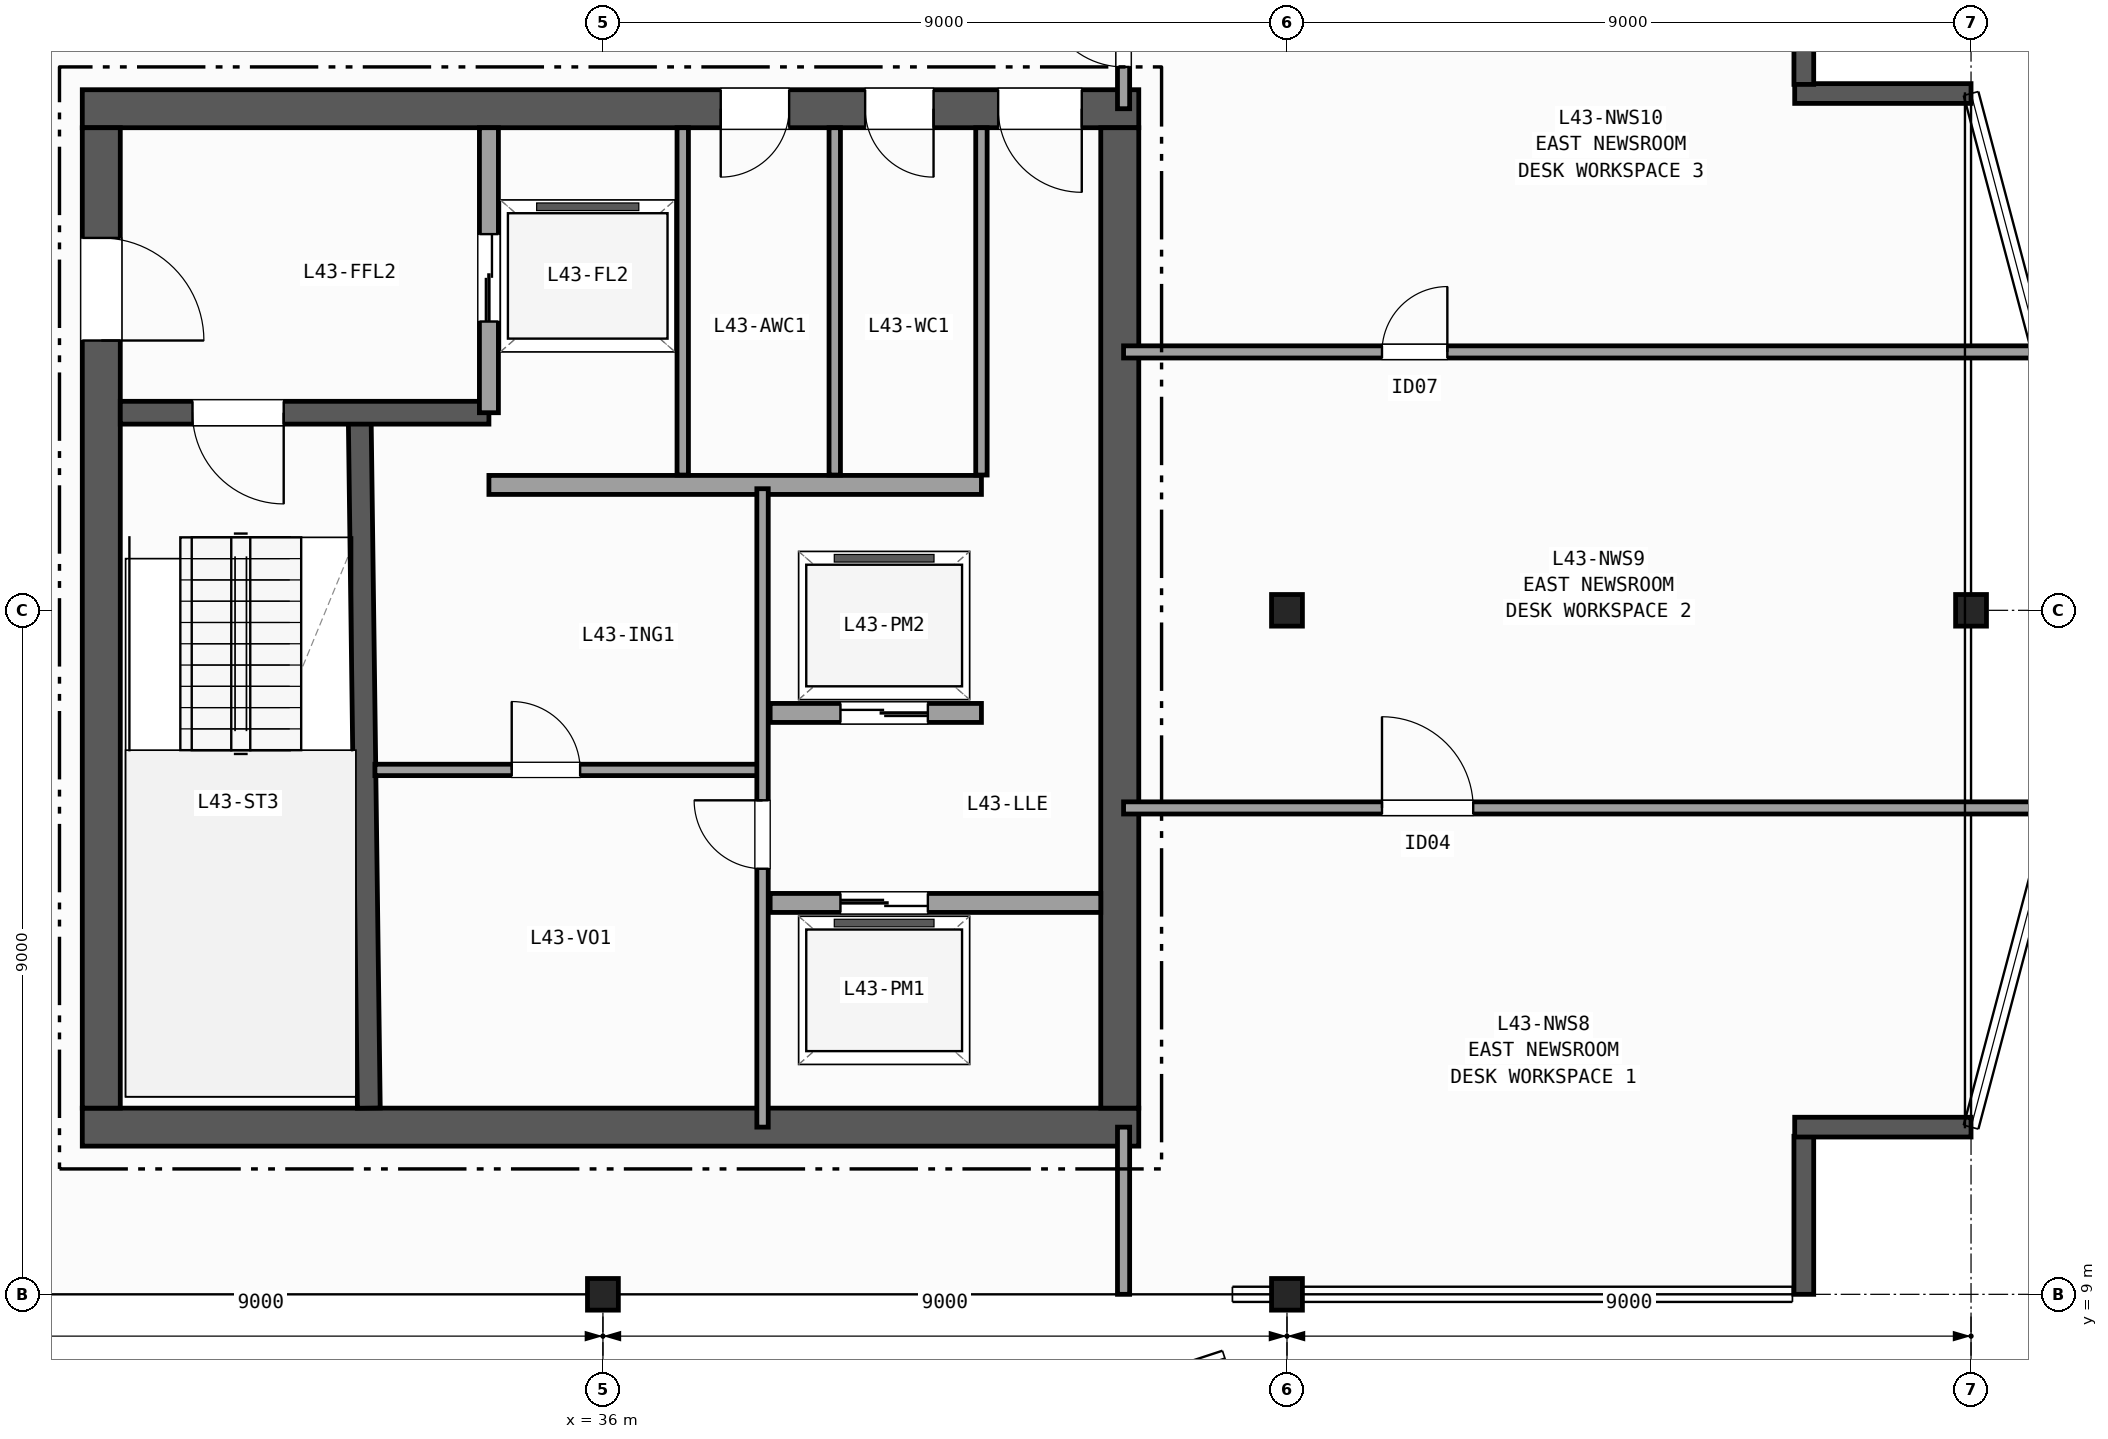
"""IFC4 building model, lengths in metres.
Left out: names, types, materials, properties, quantities, classifications, styles, units other than length and angle.
Written with IfcOpenShell. Run it as: python <this file> out.ifc"""

import sys

from ifc_helpers import new_model, si_unit, direction, frame, frame_2d, origin, origin_2d, place, context, subcontext, project, spatial, rectangle, i_section, extrude, element, fill, save


model = new_model("IFC4")
c1 = context("Model", 3, precision=1e-05, world=origin(), true_north=direction((0.0, 1.0)))
c2 = subcontext(c1, "Body", "Model", "MODEL_VIEW")
j1 = project(units=[si_unit("LENGTHUNIT", "METRE"), si_unit("PLANEANGLEUNIT", "RADIAN")], contexts=[c1])
p1 = place(None, origin())
s1 = spatial("IfcSite", under=j1, at=p1, CompositionType="ELEMENT")
p2 = place(p1, origin())
s2 = spatial("IfcBuilding", under=s1, at=p2, CompositionType="ELEMENT")
p3 = place(p2, frame((0.0, 0.0, 174.2)))
s3 = spatial("IfcBuildingStorey", under=s2, at=p3, CompositionType="ELEMENT", Elevation=174.2)
for number, where, z_axis, x_axis in (
    (1, (36.0, 9.0, 0.0), (0.0, 0.0, 1.0), (1.0, 0.0, 0.0)),
    (2, (45.0, 9.0, 0.0), (0.0, 0.0, 1.0), (1.0, 0.0, 0.0)),
    (3, (45.0, 18.0, 0.0), (0.0, 0.0, 1.0), (1.0, 0.0, 0.0)),
    (4, (54.0, 18.0, 0.0), (0.0, 0.0, 1.0), (1.0, 0.0, 0.0)),
):
    element("IfcColumn", number, at=place(p3, frame(where, z_axis=z_axis, x_axis=x_axis)), inside=s3, PredefinedType="COLUMN", context=c2, shape_type="SweptSolid", body=[
        extrude(i_section(OverallWidth=0.406, OverallDepth=0.416, WebThickness=0.03, FlangeThickness=0.048, FilletRadius=0.015, at=origin_2d()), origin(), (0.0, 0.0, 1.0), 3.7),
    ])
p4 = place(p3, frame((51.8, 9.0, 0.0), z_axis=(0.0, 0.0, 1.0), x_axis=(0.0, 1.0, 0.0)))
e5 = element("IfcWall", 5, at=p4, inside=s3, PredefinedType="SOLIDWALL", context=c2, shape_type="SweptSolid", body=[
    extrude(rectangle(XDim=2.08, YDim=0.26, at=frame_2d((1.04, 0.0))), origin(), (0.0, 0.0, 1.0), 3.42),
])
for number, where, z_axis, x_axis in (
    (6, (51.68, 11.2, 0.0), (0.0, 0.0, 1.0), (1.0, 0.0, 0.0)),
    (7, (54.0, 24.8, 0.0), (0.0, 0.0, 1.0), (-1.0, 0.0, 0.0)),
):
    element("IfcWall", number, at=place(p3, frame(where, z_axis=z_axis, x_axis=x_axis)), inside=s3, PredefinedType="SOLIDWALL", context=c2, shape_type="SweptSolid", body=[
        extrude(rectangle(XDim=2.32, YDim=0.26, at=frame_2d((1.16, 0.0))), origin(), (0.0, 0.0, 1.0), 3.42),
    ])
p5 = place(p3, frame((51.8, 24.92, 0.0), z_axis=(0.0, 0.0, 1.0), x_axis=(0.0, 1.0, 0.0)))
e8 = element("IfcWall", 8, at=p5, inside=s3, PredefinedType="SOLIDWALL", context=c2, shape_type="SweptSolid", body=[
    extrude(rectangle(XDim=2.08, YDim=0.26, at=frame_2d((1.04, 0.0))), origin(), (0.0, 0.0, 1.0), 3.42),
])
p6 = place(p3, frame((29.15, 11.2, 0.0), z_axis=(0.0, 0.0, 1.0), x_axis=(1.0, 0.0, 0.0)))
e9 = element("IfcWall", 9, at=p6, inside=s3, PredefinedType="SHEAR", context=c2, shape_type="SweptSolid", body=[
    extrude(rectangle(XDim=13.9, YDim=0.5, at=frame_2d((6.95, 0.0))), origin(), (0.0, 0.0, 1.0), 3.42),
])
p7 = place(p3, frame((43.05, 24.6, 0.0), z_axis=(0.0, 0.0, 1.0), x_axis=(-1.0, 0.0, 0.0)))
e10 = element("IfcWall", 10, at=p7, inside=s3, PredefinedType="SHEAR", context=c2, shape_type="SweptSolid", body=[
    extrude(rectangle(XDim=13.9, YDim=0.5, at=frame_2d((6.95, 0.0))), origin(), (0.0, 0.0, 1.0), 3.42),
])
p8 = place(p7, frame((0.75, 0.0, 0.0)))
e11 = element("IfcOpeningElement", 11, at=p8, cuts=e10, PredefinedType="OPENING", context=c2, shape_type="SweptSolid", body=[
    extrude(rectangle(XDim=1.1, YDim=2.15, at=frame_2d((0.55, 1.075))), frame((0.0, 0.26, 0.0), z_axis=(0.0, -1.0, 0.0), x_axis=(1.0, 0.0, 0.0)), (0.0, 0.0, 1.0), 0.52),
])
p9 = place(p7, frame((2.7, 0.0, 0.0)))
e12 = element("IfcOpeningElement", 12, at=p9, cuts=e10, PredefinedType="OPENING", context=c2, shape_type="SweptSolid", body=[
    extrude(rectangle(XDim=0.9, YDim=2.1, at=frame_2d((0.45, 1.05))), frame((0.0, 0.26, 0.0), z_axis=(0.0, -1.0, 0.0), x_axis=(1.0, 0.0, 0.0)), (0.0, 0.0, 1.0), 0.52),
])
p10 = place(p7, frame((4.6, 0.0, 0.0)))
e13 = element("IfcOpeningElement", 13, at=p10, cuts=e10, PredefinedType="OPENING", context=c2, shape_type="SweptSolid", body=[
    extrude(rectangle(XDim=0.9, YDim=2.1, at=frame_2d((0.45, 1.05))), frame((0.0, 0.26, 0.0), z_axis=(0.0, -1.0, 0.0), x_axis=(1.0, 0.0, 0.0)), (0.0, 0.0, 1.0), 0.52),
])
p11 = place(p3, frame((29.4, 24.35, 0.0), z_axis=(0.0, 0.0, 1.0), x_axis=(0.0, -1.0, 0.0)))
e14 = element("IfcWall", 14, at=p11, inside=s3, PredefinedType="SHEAR", context=c2, shape_type="SweptSolid", body=[
    extrude(rectangle(XDim=12.9, YDim=0.5, at=frame_2d((6.45, 0.0))), origin(), (0.0, 0.0, 1.0), 3.42),
])
p12 = place(p11, frame((1.45, 0.0, 0.0)))
e15 = element("IfcOpeningElement", 15, at=p12, cuts=e14, PredefinedType="OPENING", context=c2, shape_type="SweptSolid", body=[
    extrude(rectangle(XDim=1.35, YDim=2.15, at=frame_2d((0.675, 1.075))), frame((0.0, 0.26, 0.0), z_axis=(0.0, -1.0, 0.0), x_axis=(1.0, 0.0, 0.0)), (0.0, 0.0, 1.0), 0.52),
])
p13 = place(p3, frame((42.8, 11.45, 0.0), z_axis=(0.0, 0.0, 1.0), x_axis=(0.0, 1.0, 0.0)))
e16 = element("IfcWall", 16, at=p13, inside=s3, PredefinedType="SHEAR", context=c2, shape_type="SweptSolid", body=[
    extrude(rectangle(XDim=12.9, YDim=0.5, at=frame_2d((6.45, 0.0))), origin(), (0.0, 0.0, 1.0), 3.42),
])
p14 = place(p3, frame((32.92, 11.45, 0.0), z_axis=(0.0, 0.0, 1.0), x_axis=(-0.013171578211, 0.999913251001, 0.0)))
e17 = element("IfcWall", 17, at=p14, inside=s3, PredefinedType="SHEAR", context=c2, shape_type="SweptSolid", body=[
    extrude(rectangle(XDim=9.101, YDim=0.3, at=frame_2d((4.55, 0.0))), origin(), (0.0, 0.0, 1.0), 3.42),
])
p15 = place(p3, frame((34.5, 20.6, 0.0), z_axis=(0.0, 0.0, 1.0), x_axis=(-1.0, 0.0, 0.0)))
e18 = element("IfcWall", 18, at=p15, inside=s3, PredefinedType="SHEAR", context=c2, shape_type="SweptSolid", body=[
    extrude(rectangle(XDim=4.85, YDim=0.3, at=frame_2d((2.425, 0.0))), origin(), (0.0, 0.0, 1.0), 3.42),
])
p16 = place(p15, frame((2.7, 0.0, 0.0)))
e19 = element("IfcOpeningElement", 19, at=p16, cuts=e18, PredefinedType="OPENING", context=c2, shape_type="SweptSolid", body=[
    extrude(rectangle(XDim=1.2, YDim=2.15, at=frame_2d((0.6, 1.075))), frame((0.0, 0.16, 0.0), z_axis=(0.0, -1.0, 0.0), x_axis=(1.0, 0.0, 0.0)), (0.0, 0.0, 1.0), 0.32),
])
p17 = place(p3, frame((34.5, 20.6, 0.0), z_axis=(0.0, 0.0, 1.0), x_axis=(0.0, 1.0, 0.0)))
e20 = element("IfcWall", 20, at=p17, inside=s3, PredefinedType="PARTITIONING", context=c2, shape_type="SweptSolid", body=[
    extrude(rectangle(XDim=3.75, YDim=0.25, at=frame_2d((1.875, 0.0))), origin(), (0.0, 0.0, 1.0), 3.42),
])
p18 = place(p17, frame((1.2, 0.0, 0.0)))
e21 = element("IfcOpeningElement", 21, at=p18, cuts=e20, PredefinedType="OPENING", context=c2, shape_type="SweptSolid", body=[
    extrude(rectangle(XDim=1.15, YDim=2.15, at=frame_2d((0.575, 1.075))), frame((0.0, 0.135, 0.0), z_axis=(0.0, -1.0, 0.0), x_axis=(1.0, 0.0, 0.0)), (0.0, 0.0, 1.0), 0.27),
])
p19 = place(p3, frame((34.5, 19.65, 0.0), z_axis=(0.0, 0.0, 1.0), x_axis=(1.0, 0.0, 0.0)))
e22 = element("IfcWall", 22, at=p19, inside=s3, PredefinedType="PARTITIONING", context=c2, shape_type="SweptSolid", body=[
    extrude(rectangle(XDim=6.48, YDim=0.25, at=frame_2d((3.24, 0.0))), origin(), (0.0, 0.0, 1.0), 3.42),
])
p20 = place(p3, frame((38.2, 14.15, 0.0), z_axis=(0.0, 0.0, 1.0), x_axis=(1.0, 0.0, 0.0)))
e23 = element("IfcWall", 23, at=p20, inside=s3, PredefinedType="PARTITIONING", context=c2, shape_type="SweptSolid", body=[
    extrude(rectangle(XDim=4.35, YDim=0.25, at=frame_2d((2.175, 0.0))), origin(), (0.0, 0.0, 1.0), 3.42),
])
p21 = place(p20, frame((0.925, 0.0, 0.0)))
e24 = element("IfcOpeningElement", 24, at=p21, cuts=e23, PredefinedType="OPENING", context=c2, shape_type="SweptSolid", body=[
    extrude(rectangle(XDim=1.15, YDim=2.15, at=frame_2d((0.575, 1.075))), frame((0.0, 0.135, 0.0), z_axis=(0.0, -1.0, 0.0), x_axis=(1.0, 0.0, 0.0)), (0.0, 0.0, 1.0), 0.27),
])
p22 = place(p3, frame((40.98, 16.65, 0.0), z_axis=(0.0, 0.0, 1.0), x_axis=(-1.0, 0.0, 0.0)))
e25 = element("IfcWall", 25, at=p22, inside=s3, PredefinedType="PARTITIONING", context=c2, shape_type="SweptSolid", body=[
    extrude(rectangle(XDim=2.78, YDim=0.25, at=frame_2d((1.39, 0.0))), origin(), (0.0, 0.0, 1.0), 3.42),
])
p23 = place(p22, frame((0.705, 0.0, 0.0)))
e26 = element("IfcOpeningElement", 26, at=p23, cuts=e25, PredefinedType="OPENING", context=c2, shape_type="SweptSolid", body=[
    extrude(rectangle(XDim=1.15, YDim=2.15, at=frame_2d((0.575, 1.075))), frame((0.0, 0.135, 0.0), z_axis=(0.0, -1.0, 0.0), x_axis=(1.0, 0.0, 0.0)), (0.0, 0.0, 1.0), 0.27),
])
p24 = place(p3, frame((33.0, 15.9, 0.0), z_axis=(0.0, 0.0, 1.0), x_axis=(1.0, 0.0, 0.0)))
e27 = element("IfcWall", 27, at=p24, inside=s3, PredefinedType="PARTITIONING", context=c2, shape_type="SweptSolid", body=[
    extrude(rectangle(XDim=5.1, YDim=0.15, at=frame_2d((2.55, 0.0))), origin(), (0.0, 0.0, 1.0), 3.42),
])
p25 = place(p24, frame((1.8, 0.0, 0.0)))
e28 = element("IfcOpeningElement", 28, at=p25, cuts=e27, PredefinedType="OPENING", context=c2, shape_type="SweptSolid", body=[
    extrude(rectangle(XDim=0.9, YDim=2.1, at=frame_2d((0.45, 1.05))), frame((0.0, 0.085, 0.0), z_axis=(0.0, -1.0, 0.0), x_axis=(1.0, 0.0, 0.0)), (0.0, 0.0, 1.0), 0.17),
])
p26 = place(p3, frame((38.1, 11.2, 0.0), z_axis=(0.0, 0.0, 1.0), x_axis=(0.0, 1.0, 0.0)))
e29 = element("IfcWall", 29, at=p26, inside=s3, PredefinedType="PARTITIONING", context=c2, shape_type="SweptSolid", body=[
    extrude(rectangle(XDim=8.4, YDim=0.15, at=frame_2d((4.2, 0.0))), origin(), (0.0, 0.0, 1.0), 3.42),
])
p27 = place(p26, frame((3.4, 0.0, 0.0)))
e30 = element("IfcOpeningElement", 30, at=p27, cuts=e29, PredefinedType="OPENING", context=c2, shape_type="SweptSolid", body=[
    extrude(rectangle(XDim=0.9, YDim=2.1, at=frame_2d((0.45, 1.05))), frame((0.0, 0.085, 0.0), z_axis=(0.0, -1.0, 0.0), x_axis=(1.0, 0.0, 0.0)), (0.0, 0.0, 1.0), 0.17),
])
for number, where, z_axis, x_axis in (
    (31, (37.05, 19.78, 0.0), (0.0, 0.0, 1.0), (0.0, 1.0, 0.0)),
    (32, (39.05, 19.78, 0.0), (0.0, 0.0, 1.0), (0.0, 1.0, 0.0)),
    (33, (40.98, 19.78, 0.0), (0.0, 0.0, 1.0), (0.0, 1.0, 0.0)),
):
    element("IfcWall", number, at=place(p3, frame(where, z_axis=z_axis, x_axis=x_axis)), inside=s3, PredefinedType="PARTITIONING", context=c2, shape_type="SweptSolid", body=[
        extrude(rectangle(XDim=4.57, YDim=0.15, at=frame_2d((2.285, 0.0))), origin(), (0.0, 0.0, 1.0), 3.42),
    ])
p28 = place(p3, frame((42.85, 9.0, 0.0), z_axis=(0.0, 0.0, 1.0), x_axis=(0.0, 1.0, 0.0)))
e34 = element("IfcWall", 34, at=p28, inside=s3, PredefinedType="PARTITIONING", context=c2, shape_type="SweptSolid", body=[
    extrude(rectangle(XDim=2.2, YDim=0.16, at=frame_2d((1.1, 0.0))), origin(), (0.0, 0.0, 1.0), 2.634),
])
p29 = place(p3, frame((42.85, 24.6, 0.0), z_axis=(0.0, 0.0, 1.0), x_axis=(0.0, 1.0, 0.0)))
e35 = element("IfcWall", 35, at=p29, inside=s3, PredefinedType="PARTITIONING", context=c2, shape_type="SweptSolid", body=[
    extrude(rectangle(XDim=2.4, YDim=0.16, at=frame_2d((1.2, 0.0))), origin(), (0.0, 0.0, 1.0), 2.634),
])
p30 = place(p29, frame((0.55, 0.0, 0.0)))
e36 = element("IfcOpeningElement", 36, at=p30, cuts=e35, PredefinedType="OPENING", context=c2, shape_type="SweptSolid", body=[
    extrude(rectangle(XDim=1.05, YDim=2.15, at=frame_2d((0.525, 1.075))), frame((0.0, 0.09, 0.0), z_axis=(0.0, -1.0, 0.0), x_axis=(1.0, 0.0, 0.0)), (0.0, 0.0, 1.0), 0.18),
])
p31 = place(p3, frame((42.85, 15.4, 0.0), z_axis=(0.0, 0.0, 1.0), x_axis=(1.0, 0.0, 0.0)))
e37 = element("IfcWall", 37, at=p31, inside=s3, PredefinedType="PARTITIONING", context=c2, shape_type="SweptSolid", body=[
    extrude(rectangle(XDim=12.262, YDim=0.16, at=frame_2d((6.131, 0.0))), origin(), (0.0, 0.0, 1.0), 3.42),
])
p32 = place(p31, frame((3.4, 0.0, 0.0)))
e38 = element("IfcOpeningElement", 38, at=p32, cuts=e37, PredefinedType="OPENING", context=c2, shape_type="SweptSolid", body=[
    extrude(rectangle(XDim=1.2, YDim=2.15, at=frame_2d((0.6, 1.075))), frame((0.0, 0.09, 0.0), z_axis=(0.0, -1.0, 0.0), x_axis=(1.0, 0.0, 0.0)), (0.0, 0.0, 1.0), 0.18),
])
p33 = place(p3, frame((42.85, 21.4, 0.0), z_axis=(0.0, 0.0, 1.0), x_axis=(1.0, 0.0, 0.0)))
e39 = element("IfcWall", 39, at=p33, inside=s3, PredefinedType="PARTITIONING", context=c2, shape_type="SweptSolid", body=[
    extrude(rectangle(XDim=12.05, YDim=0.16, at=frame_2d((6.025, 0.0))), origin(), (0.0, 0.0, 1.0), 3.42),
])
p34 = place(p33, frame((3.4, 0.0, 0.0)))
e40 = element("IfcOpeningElement", 40, at=p34, cuts=e39, PredefinedType="OPENING", context=c2, shape_type="SweptSolid", body=[
    extrude(rectangle(XDim=0.86, YDim=2.05, at=frame_2d((0.43, 1.025))), frame((0.0, 0.09, 0.0), z_axis=(0.0, -1.0, 0.0), x_axis=(1.0, 0.0, 0.0)), (0.0, 0.0, 1.0), 0.18),
])
p35 = place(p16, origin())
e41 = element("IfcDoor", 41, at=p35, inside=s3, OperationType="SINGLE_SWING_LEFT", PredefinedType="DOOR", context=c2, shape_type="SweptSolid", body=[
    extrude(rectangle(XDim=1.2, YDim=2.15, at=frame_2d((0.6, 1.075))), frame((0.0, 0.025, 0.0), z_axis=(0.0, -1.0, 0.0), x_axis=(1.0, 0.0, 0.0)), (0.0, 0.0, 1.0), 0.05),
])
fill(e19, e41)
p36 = place(p12, origin())
e42 = element("IfcDoor", 42, at=p36, inside=s3, OperationType="SINGLE_SWING_RIGHT", PredefinedType="DOOR", context=c2, shape_type="SweptSolid", body=[
    extrude(rectangle(XDim=1.35, YDim=2.15, at=frame_2d((0.675, 1.075))), frame((0.0, 0.025, 0.0), z_axis=(0.0, -1.0, 0.0), x_axis=(1.0, 0.0, 0.0)), (0.0, 0.0, 1.0), 0.05),
])
fill(e15, e42)
p37 = place(p8, origin())
e43 = element("IfcDoor", 43, at=p37, inside=s3, OperationType="SINGLE_SWING_LEFT", PredefinedType="DOOR", context=c2, shape_type="SweptSolid", body=[
    extrude(rectangle(XDim=1.1, YDim=2.15, at=frame_2d((0.55, 1.075))), frame((0.0, 0.025, 0.0), z_axis=(0.0, -1.0, 0.0), x_axis=(1.0, 0.0, 0.0)), (0.0, 0.0, 1.0), 0.05),
])
fill(e11, e43)
p38 = place(p9, origin())
e44 = element("IfcDoor", 44, at=p38, inside=s3, OperationType="SINGLE_SWING_LEFT", PredefinedType="DOOR", context=c2, shape_type="SweptSolid", body=[
    extrude(rectangle(XDim=0.9, YDim=2.1, at=frame_2d((0.45, 1.05))), frame((0.0, 0.025, 0.0), z_axis=(0.0, -1.0, 0.0), x_axis=(1.0, 0.0, 0.0)), (0.0, 0.0, 1.0), 0.05),
])
fill(e12, e44)
p39 = place(p10, origin())
e45 = element("IfcDoor", 45, at=p39, inside=s3, OperationType="SINGLE_SWING_RIGHT", PredefinedType="DOOR", context=c2, shape_type="SweptSolid", body=[
    extrude(rectangle(XDim=0.9, YDim=2.1, at=frame_2d((0.45, 1.05))), frame((0.0, 0.025, 0.0), z_axis=(0.0, -1.0, 0.0), x_axis=(1.0, 0.0, 0.0)), (0.0, 0.0, 1.0), 0.05),
])
fill(e13, e45)
p40 = place(p18, origin())
e46 = element("IfcDoor", 46, at=p40, inside=s3, OperationType="DOUBLE_DOOR_SLIDING", PredefinedType="DOOR", context=c2, shape_type="SweptSolid", body=[
    extrude(rectangle(XDim=1.15, YDim=2.15, at=frame_2d((0.575, 1.075))), frame((0.0, 0.025, 0.0), z_axis=(0.0, -1.0, 0.0), x_axis=(1.0, 0.0, 0.0)), (0.0, 0.0, 1.0), 0.05),
])
fill(e21, e46)
p41 = place(p21, origin())
e47 = element("IfcDoor", 47, at=p41, inside=s3, OperationType="DOUBLE_DOOR_SLIDING", PredefinedType="DOOR", context=c2, shape_type="SweptSolid", body=[
    extrude(rectangle(XDim=1.15, YDim=2.15, at=frame_2d((0.575, 1.075))), frame((0.0, 0.025, 0.0), z_axis=(0.0, -1.0, 0.0), x_axis=(1.0, 0.0, 0.0)), (0.0, 0.0, 1.0), 0.05),
])
fill(e24, e47)
p42 = place(p23, origin())
e48 = element("IfcDoor", 48, at=p42, inside=s3, OperationType="DOUBLE_DOOR_SLIDING", PredefinedType="DOOR", context=c2, shape_type="SweptSolid", body=[
    extrude(rectangle(XDim=1.15, YDim=2.15, at=frame_2d((0.575, 1.075))), frame((0.0, 0.025, 0.0), z_axis=(0.0, -1.0, 0.0), x_axis=(1.0, 0.0, 0.0)), (0.0, 0.0, 1.0), 0.05),
])
fill(e26, e48)
p43 = place(p27, origin())
e49 = element("IfcDoor", 49, at=p43, inside=s3, OperationType="SINGLE_SWING_RIGHT", PredefinedType="DOOR", context=c2, shape_type="SweptSolid", body=[
    extrude(rectangle(XDim=0.9, YDim=2.1, at=frame_2d((0.45, 1.05))), frame((0.0, 0.025, 0.0), z_axis=(0.0, -1.0, 0.0), x_axis=(1.0, 0.0, 0.0)), (0.0, 0.0, 1.0), 0.05),
])
fill(e30, e49)
p44 = place(p25, origin())
e50 = element("IfcDoor", 50, at=p44, inside=s3, OperationType="SINGLE_SWING_LEFT", PredefinedType="DOOR", context=c2, shape_type="SweptSolid", body=[
    extrude(rectangle(XDim=0.9, YDim=2.1, at=frame_2d((0.45, 1.05))), frame((0.0, 0.025, 0.0), z_axis=(0.0, -1.0, 0.0), x_axis=(1.0, 0.0, 0.0)), (0.0, 0.0, 1.0), 0.05),
])
fill(e28, e50)
p45 = place(p30, origin())
e51 = element("IfcDoor", 51, at=p45, inside=s3, OperationType="SINGLE_SWING_RIGHT", PredefinedType="DOOR", context=c2, shape_type="SweptSolid", body=[
    extrude(rectangle(XDim=1.05, YDim=2.15, at=frame_2d((0.525, 1.075))), frame((0.0, 0.025, 0.0), z_axis=(0.0, -1.0, 0.0), x_axis=(1.0, 0.0, 0.0)), (0.0, 0.0, 1.0), 0.05),
])
fill(e36, e51)
p46 = place(p32, origin())
e52 = element("IfcDoor", 52, at=p46, inside=s3, OperationType="SINGLE_SWING_LEFT", PredefinedType="DOOR", context=c2, shape_type="SweptSolid", body=[
    extrude(rectangle(XDim=1.2, YDim=2.15, at=frame_2d((0.6, 1.075))), frame((0.0, 0.025, 0.0), z_axis=(0.0, -1.0, 0.0), x_axis=(1.0, 0.0, 0.0)), (0.0, 0.0, 1.0), 0.05),
])
fill(e38, e52)
p47 = place(p34, origin())
e53 = element("IfcDoor", 53, at=p47, inside=s3, OperationType="SINGLE_SWING_RIGHT", PredefinedType="DOOR", context=c2, shape_type="SweptSolid", body=[
    extrude(rectangle(XDim=0.86, YDim=2.05, at=frame_2d((0.43, 1.025))), frame((0.0, 0.025, 0.0), z_axis=(0.0, -1.0, 0.0), x_axis=(1.0, 0.0, 0.0)), (0.0, 0.0, 1.0), 0.05),
])
fill(e40, e53)
save(model, sys.argv[1])
